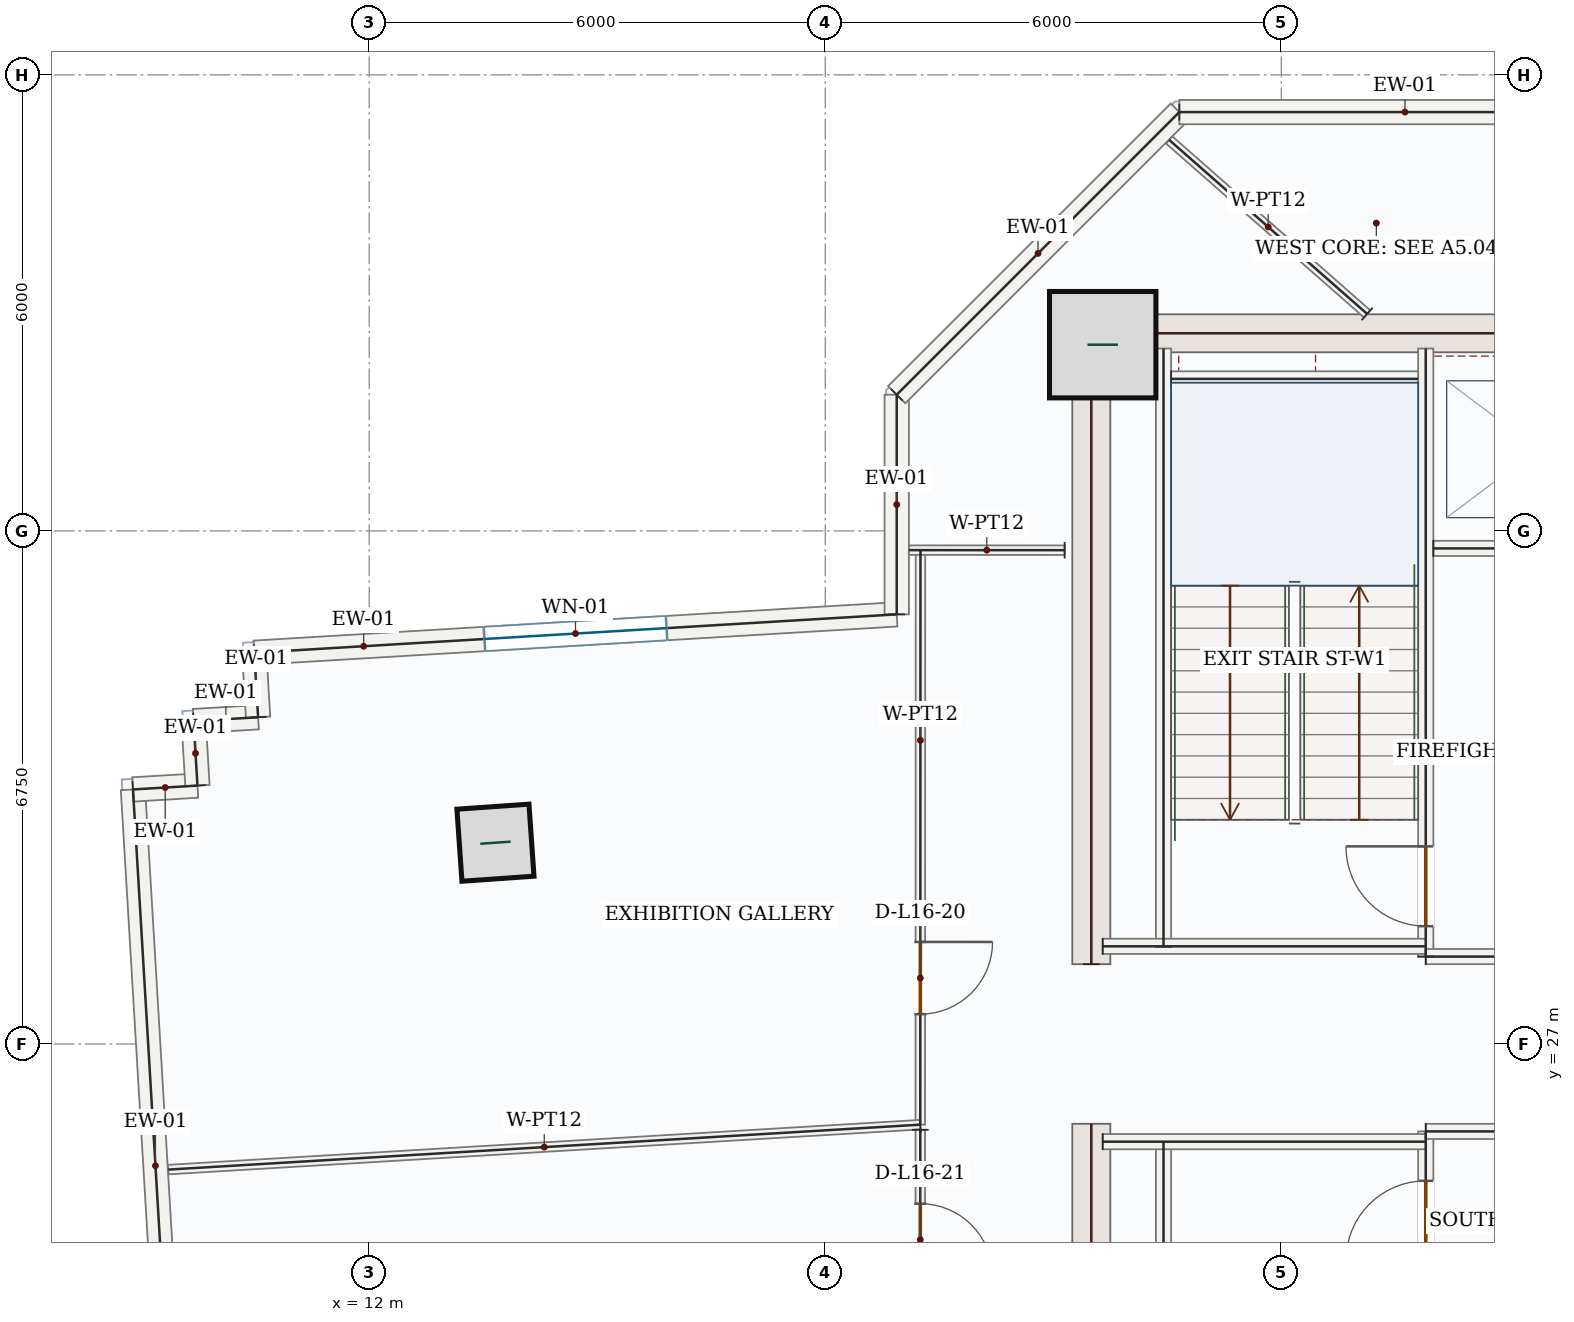
"""IFC4 building model, lengths in metres.
Left out: names, types, materials, properties, quantities, classifications, styles, units other than length and angle.
Written with IfcOpenShell. Run it as: python <this file> out.ifc"""

import sys

from ifc_helpers import new_model, si_unit, direction, frame, frame_2d, origin, origin_2d, place, context, subcontext, project, spatial, rectangle, hollow_rectangle, extrude, source, transform, mapped, element, fill, save


model = new_model("IFC4")
c1 = context("Model", 3, precision=1e-05, world=origin(), true_north=direction((0.0, 1.0)))
c2 = subcontext(c1, "Body", "Model", "MODEL_VIEW")
j1 = project(units=[si_unit("LENGTHUNIT", "METRE"), si_unit("PLANEANGLEUNIT", "RADIAN")], contexts=[c1])
p1 = place(None, origin())
s1 = spatial("IfcSite", under=j1, at=p1, CompositionType="ELEMENT")
p2 = place(p1, origin())
s2 = spatial("IfcBuilding", under=s1, at=p2, CompositionType="ELEMENT")
p3 = place(p2, frame((0.0, 0.0, 75.3)))
s3 = spatial("IfcBuildingStorey", under=s2, at=p3, CompositionType="ELEMENT", Elevation=75.3)
m1 = source(origin(), c2, "Body", "SweptSolid", [
    extrude(rectangle(XDim=8.55, YDim=0.5, at=frame_2d((4.275, 0.0))), origin(), (0.0, 0.0, 1.0), 3.95),
])
for number, where, z_axis, x_axis in (
    (1, (21.5, 17.4, 0.0), (0.0, 0.0, 1.0), (0.0, 1.0, 0.0)),
    (2, (21.5, 28.05, 0.0), (0.0, 0.0, 1.0), (0.0, 1.0, 0.0)),
):
    element("IfcWall", number, at=place(p3, frame(where, z_axis=z_axis, x_axis=x_axis)), inside=s3, PredefinedType="SHEAR", context=c2, shape_type="MappedRepresentation", body=[
        mapped(m1, transform((0.0, 0.0, 0.0), x_axis=(1.0, 0.0, 0.0), y_axis=(0.0, 1.0, 0.0), z_axis=(0.0, 0.0, 1.0), scale=1.0)),
    ])
m2 = source(origin(), c2, "Body", "SweptSolid", [
    extrude(rectangle(XDim=7.0, YDim=0.5, at=frame_2d((3.5, 0.0))), origin(), (0.0, 0.0, 1.0), 3.95),
])
p4 = place(p3, frame((21.75, 36.35, 0.0), z_axis=(0.0, 0.0, 1.0), x_axis=(1.0, 0.0, 0.0)))
e3 = element("IfcWall", 3, at=p4, inside=s3, PredefinedType="SHEAR", context=c2, shape_type="MappedRepresentation", body=[
    mapped(m2, transform((0.0, 0.0, 0.0), x_axis=(1.0, 0.0, 0.0), y_axis=(0.0, 1.0, 0.0), z_axis=(0.0, 0.0, 1.0), scale=1.0)),
])
m3 = source(origin(), c2, "Body", "SweptSolid", [
    extrude(rectangle(XDim=1.4, YDim=1.4, at=origin_2d()), origin(), (0.0, 0.0, 1.0), 4.2),
])
p5 = place(p3, frame((21.65, 36.2, 0.0), z_axis=(0.0, 0.0, 1.0), x_axis=(1.0, 0.0, 0.0)))
e4 = element("IfcColumn", 4, at=p5, inside=s3, PredefinedType="COLUMN", context=c2, shape_type="MappedRepresentation", body=[
    mapped(m3, transform((0.0, 0.0, 0.0), x_axis=(1.0, 0.0, 0.0), y_axis=(0.0, 1.0, 0.0), z_axis=(0.0, 0.0, 1.0), scale=1.0)),
])
m4 = source(origin(), c2, "Body", "SweptSolid", [
    extrude(hollow_rectangle(XDim=0.95, YDim=0.95, WallThickness=0.05, at=origin_2d()), origin(), (0.0, 0.0, 1.0), 4.2),
])
p6 = place(p3, frame((13.661, 29.648, 0.0), z_axis=(0.0, 0.0, 1.0), x_axis=(0.99756405026, 0.069756473744, 0.0)))
e5 = element("IfcColumn", 5, at=p6, inside=s3, PredefinedType="COLUMN", context=c2, shape_type="MappedRepresentation", body=[
    mapped(m4, transform((0.0, 0.0, 0.0), x_axis=(1.0, 0.0, 0.0), y_axis=(0.0, 1.0, 0.0), z_axis=(0.0, 0.0, 1.0), scale=1.0)),
])
m5 = source(origin(), c2, "Body", "SweptSolid", [
    extrude(rectangle(XDim=9.92, YDim=0.32, at=frame_2d((4.96, 0.0))), origin(), (0.0, 0.0, 1.0), 3.95),
])
p7 = place(p3, frame((9.484, 20.447, 0.0), z_axis=(0.0, 0.0, 1.0), x_axis=(-0.059656871726, 0.998218942745, 0.0)))
e6 = element("IfcWall", 6, at=p7, inside=s3, PredefinedType="SOLIDWALL", context=c2, shape_type="MappedRepresentation", body=[
    mapped(m5, transform((0.0, 0.0, 0.0), x_axis=(1.0, 0.0, 0.0), y_axis=(0.0, 1.0, 0.0), z_axis=(0.0, 0.0, 1.0), scale=1.0)),
])
m6 = source(origin(), c2, "Body", "SweptSolid", [
    extrude(rectangle(XDim=0.85, YDim=0.32, at=frame_2d((0.425, 0.0))), origin(), (0.0, 0.0, 1.0), 3.95),
])
for number, where, z_axis, x_axis in (
    (7, (8.892, 30.349, 0.0), (0.0, 0.0, 1.0), (0.998, 0.059, 0.0)),
    (8, (9.74, 30.399, 0.0), (0.0, 0.0, 1.0), (-0.06, 0.998, 0.0)),
):
    element("IfcWall", number, at=place(p3, frame(where, z_axis=z_axis, x_axis=x_axis)), inside=s3, PredefinedType="SOLIDWALL", context=c2, shape_type="MappedRepresentation", body=[
        mapped(m6, transform((0.0, 0.0, 0.0), x_axis=(1.0, 0.0, 0.0), y_axis=(0.0, 1.0, 0.0), z_axis=(0.0, 0.0, 1.0), scale=1.0)),
    ])
m7 = source(origin(), c2, "Body", "SweptSolid", [
    extrude(rectangle(XDim=0.85, YDim=0.32, at=frame_2d((0.425, 0.0))), origin(), (0.0, 0.0, 1.0), 3.95),
])
p8 = place(p3, frame((9.69, 31.248, 0.0), z_axis=(0.0, 0.0, 1.0), x_axis=(0.998230513845, 0.059462939961, 0.0)))
e9 = element("IfcWall", 9, at=p8, inside=s3, PredefinedType="SOLIDWALL", context=c2, shape_type="MappedRepresentation", body=[
    mapped(m7, transform((0.0, 0.0, 0.0), x_axis=(1.0, 0.0, 0.0), y_axis=(0.0, 1.0, 0.0), z_axis=(0.0, 0.0, 1.0), scale=1.0)),
])
p9 = place(p3, frame((10.538, 31.299, 0.0), z_axis=(0.0, 0.0, 1.0), x_axis=(-0.059445893707, 0.998231529116, 0.0)))
e10 = element("IfcWall", 10, at=p9, inside=s3, PredefinedType="SOLIDWALL", context=c2, shape_type="MappedRepresentation", body=[
    mapped(m6, transform((0.0, 0.0, 0.0), x_axis=(1.0, 0.0, 0.0), y_axis=(0.0, 1.0, 0.0), z_axis=(0.0, 0.0, 1.0), scale=1.0)),
])
p10 = place(p3, frame((10.488, 32.147, 0.0), z_axis=(0.0, 0.0, 1.0), x_axis=(0.998219055518, 0.059654984716, 0.0)))
e11 = element("IfcWall", 11, at=p10, inside=s3, PredefinedType="SOLIDWALL", context=c2, shape_type="SweptSolid", body=[
    extrude(rectangle(XDim=8.468, YDim=0.32, at=frame_2d((4.234, 0.0))), origin(), (0.0, 0.0, 1.0), 3.95),
])
p11 = place(p10, frame((3.034, 0.0, 0.85)))
e12 = element("IfcOpeningElement", 12, at=p11, cuts=e11, PredefinedType="OPENING", context=c2, shape_type="SweptSolid", body=[
    extrude(rectangle(XDim=2.4, YDim=1.8, at=frame_2d((1.2, 0.9))), frame((0.0, 0.17, 0.0), z_axis=(0.0, -1.0, 0.0), x_axis=(1.0, 0.0, 0.0)), (0.0, 0.0, 1.0), 0.34),
])
m8 = source(origin(), c2, "Body", "SweptSolid", [
    extrude(rectangle(XDim=2.89, YDim=0.32, at=frame_2d((1.445, 0.0))), origin(), (0.0, 0.0, 1.0), 3.95),
])
p12 = place(p3, frame((18.94, 32.652, 0.0), z_axis=(0.0, 0.0, 1.0), x_axis=(0.0, 1.0, 0.0)))
e13 = element("IfcWall", 13, at=p12, inside=s3, PredefinedType="SOLIDWALL", context=c2, shape_type="MappedRepresentation", body=[
    mapped(m8, transform((0.0, 0.0, 0.0), x_axis=(1.0, 0.0, 0.0), y_axis=(0.0, 1.0, 0.0), z_axis=(0.0, 0.0, 1.0), scale=1.0)),
])
m9 = source(origin(), c2, "Body", "SweptSolid", [
    extrude(rectangle(XDim=5.258, YDim=0.32, at=frame_2d((2.629, 0.0))), origin(), (0.0, 0.0, 1.0), 3.95),
])
p13 = place(p3, frame((18.94, 35.542, 0.0), z_axis=(0.0, 0.0, 1.0), x_axis=(0.707106781187, 0.707106781187, 0.0)))
e14 = element("IfcWall", 14, at=p13, inside=s3, PredefinedType="SOLIDWALL", context=c2, shape_type="MappedRepresentation", body=[
    mapped(m9, transform((0.0, 0.0, 0.0), x_axis=(1.0, 0.0, 0.0), y_axis=(0.0, 1.0, 0.0), z_axis=(0.0, 0.0, 1.0), scale=1.0)),
])
m10 = source(origin(), c2, "Body", "SweptSolid", [
    extrude(rectangle(XDim=5.938, YDim=0.32, at=frame_2d((2.969, 0.0))), origin(), (0.0, 0.0, 1.0), 3.95),
])
p14 = place(p3, frame((22.658, 39.26, 0.0), z_axis=(0.0, 0.0, 1.0), x_axis=(1.0, 0.0, 0.0)))
e15 = element("IfcWall", 15, at=p14, inside=s3, PredefinedType="SOLIDWALL", context=c2, shape_type="MappedRepresentation", body=[
    mapped(m10, transform((0.0, 0.0, 0.0), x_axis=(1.0, 0.0, 0.0), y_axis=(0.0, 1.0, 0.0), z_axis=(0.0, 0.0, 1.0), scale=1.0)),
])
m11 = source(origin(), c2, "Body", "SweptSolid", [
    extrude(rectangle(XDim=7.87, YDim=0.2, at=frame_2d((3.935, 0.0))), origin(), (0.0, 0.0, 1.0), 3.95),
])
for number, where, z_axis, x_axis in (
    (16, (22.45, 17.85, 0.0), (0.0, 0.0, 1.0), (0.0, 1.0, 0.0)),
    (17, (22.45, 28.28, 0.0), (0.0, 0.0, 1.0), (0.0, 1.0, 0.0)),
):
    element("IfcWall", number, at=place(p3, frame(where, z_axis=z_axis, x_axis=x_axis)), inside=s3, PredefinedType="SOLIDWALL", context=c2, shape_type="MappedRepresentation", body=[
        mapped(m11, transform((0.0, 0.0, 0.0), x_axis=(1.0, 0.0, 0.0), y_axis=(0.0, 1.0, 0.0), z_axis=(0.0, 0.0, 1.0), scale=1.0)),
    ])
p15 = place(p3, frame((25.9, 17.85, 0.0), z_axis=(0.0, 0.0, 1.0), x_axis=(0.0, 1.0, 0.0)))
e18 = element("IfcWall", 18, at=p15, inside=s3, PredefinedType="SOLIDWALL", context=c2, shape_type="SweptSolid", body=[
    extrude(rectangle(XDim=8.0, YDim=0.2, at=frame_2d((4.0, 0.0))), origin(), (0.0, 0.0, 1.0), 3.95),
])
p16 = place(p15, frame((6.3, 0.0, 0.0)))
e19 = element("IfcOpeningElement", 19, at=p16, cuts=e18, PredefinedType="OPENING", context=c2, shape_type="SweptSolid", body=[
    extrude(rectangle(XDim=1.05, YDim=2.15, at=frame_2d((0.525, 1.075))), frame((0.0, 0.11, 0.0), z_axis=(0.0, -1.0, 0.0), x_axis=(1.0, 0.0, 0.0)), (0.0, 0.0, 1.0), 0.22),
])
p17 = place(p3, frame((25.9, 28.15, 0.0), z_axis=(0.0, 0.0, 1.0), x_axis=(0.0, 1.0, 0.0)))
e20 = element("IfcWall", 20, at=p17, inside=s3, PredefinedType="SOLIDWALL", context=c2, shape_type="SweptSolid", body=[
    extrude(rectangle(XDim=8.0, YDim=0.2, at=frame_2d((4.0, 0.0))), origin(), (0.0, 0.0, 1.0), 3.95),
])
p18 = place(p17, frame((0.4, 0.0, 0.0)))
e21 = element("IfcOpeningElement", 21, at=p18, cuts=e20, PredefinedType="OPENING", context=c2, shape_type="SweptSolid", body=[
    extrude(rectangle(XDim=1.05, YDim=2.15, at=frame_2d((0.525, 1.075))), frame((0.0, 0.11, 0.0), z_axis=(0.0, -1.0, 0.0), x_axis=(1.0, 0.0, 0.0)), (0.0, 0.0, 1.0), 0.22),
])
m12 = source(origin(), c2, "Body", "SweptSolid", [
    extrude(rectangle(XDim=4.25, YDim=0.2, at=frame_2d((2.125, 0.0))), origin(), (0.0, 0.0, 1.0), 3.95),
])
p19 = place(p3, frame((21.65, 25.715, 0.0), z_axis=(0.0, 0.0, 1.0), x_axis=(1.0, 0.0, 0.0)))
e22 = element("IfcWall", 22, at=p19, inside=s3, PredefinedType="SOLIDWALL", context=c2, shape_type="MappedRepresentation", body=[
    mapped(m12, transform((0.0, 0.0, 0.0), x_axis=(1.0, 0.0, 0.0), y_axis=(0.0, 1.0, 0.0), z_axis=(0.0, 0.0, 1.0), scale=1.0)),
])
m13 = source(origin(), c2, "Body", "SweptSolid", [
    extrude(rectangle(XDim=3.0, YDim=0.2, at=frame_2d((1.5, 0.0))), origin(), (0.0, 0.0, 1.0), 3.95),
])
p20 = place(p3, frame((25.9, 25.85, 0.0), z_axis=(0.0, 0.0, 1.0), x_axis=(1.0, 0.0, 0.0)))
e23 = element("IfcWall", 23, at=p20, inside=s3, PredefinedType="SOLIDWALL", context=c2, shape_type="MappedRepresentation", body=[
    mapped(m13, transform((0.0, 0.0, 0.0), x_axis=(1.0, 0.0, 0.0), y_axis=(0.0, 1.0, 0.0), z_axis=(0.0, 0.0, 1.0), scale=1.0)),
])
p21 = place(p3, frame((21.65, 28.285, 0.0), z_axis=(0.0, 0.0, 1.0), x_axis=(1.0, 0.0, 0.0)))
e24 = element("IfcWall", 24, at=p21, inside=s3, PredefinedType="SOLIDWALL", context=c2, shape_type="MappedRepresentation", body=[
    mapped(m12, transform((0.0, 0.0, 0.0), x_axis=(1.0, 0.0, 0.0), y_axis=(0.0, 1.0, 0.0), z_axis=(0.0, 0.0, 1.0), scale=1.0)),
])
p22 = place(p3, frame((25.9, 28.15, 0.0), z_axis=(0.0, 0.0, 1.0), x_axis=(1.0, 0.0, 0.0)))
e25 = element("IfcWall", 25, at=p22, inside=s3, PredefinedType="SOLIDWALL", context=c2, shape_type="MappedRepresentation", body=[
    mapped(m13, transform((0.0, 0.0, 0.0), x_axis=(1.0, 0.0, 0.0), y_axis=(0.0, 1.0, 0.0), z_axis=(0.0, 0.0, 1.0), scale=1.0)),
])
m14 = source(origin(), c2, "Body", "SweptSolid", [
    extrude(rectangle(XDim=3.25, YDim=0.2, at=frame_2d((1.625, 0.0))), origin(), (0.0, 0.0, 1.0), 3.95),
])
p23 = place(p3, frame((22.55, 35.75, 0.0), z_axis=(0.0, 0.0, 1.0), x_axis=(1.0, 0.0, 0.0)))
e26 = element("IfcWall", 26, at=p23, inside=s3, PredefinedType="SOLIDWALL", context=c2, shape_type="MappedRepresentation", body=[
    mapped(m14, transform((0.0, 0.0, 0.0), x_axis=(1.0, 0.0, 0.0), y_axis=(0.0, 1.0, 0.0), z_axis=(0.0, 0.0, 1.0), scale=1.0)),
])
p24 = place(p3, frame((26.0, 33.52, 0.0), z_axis=(0.0, 0.0, 1.0), x_axis=(1.0, 0.0, 0.0)))
e27 = element("IfcWall", 27, at=p24, inside=s3, PredefinedType="SOLIDWALL", context=c2, shape_type="SweptSolid", body=[
    extrude(rectangle(XDim=2.75, YDim=0.2, at=frame_2d((1.375, 0.0))), origin(), (0.0, 0.0, 1.0), 3.95),
])
p25 = place(p24, frame((0.82, 0.0, 0.0)))
e28 = element("IfcOpeningElement", 28, at=p25, cuts=e27, PredefinedType="OPENING", context=c2, shape_type="SweptSolid", body=[
    extrude(rectangle(XDim=1.1, YDim=2.15, at=frame_2d((0.55, 1.075))), frame((0.0, 0.11, 0.0), z_axis=(0.0, -1.0, 0.0), x_axis=(1.0, 0.0, 0.0)), (0.0, 0.0, 1.0), 0.22),
])
m15 = source(origin(), c2, "Body", "SweptSolid", [
    extrude(rectangle(XDim=3.467, YDim=0.125, at=frame_2d((1.733, 0.0))), origin(), (0.0, 0.0, 1.0), 3.95),
])
p26 = place(p3, frame((25.129, 36.605, 0.0), z_axis=(0.0, 0.0, 1.0), x_axis=(-0.751135268809, 0.66014832269, 0.0)))
e29 = element("IfcWall", 29, at=p26, inside=s3, PredefinedType="PARTITIONING", context=c2, shape_type="MappedRepresentation", body=[
    mapped(m15, transform((0.0, 0.0, 0.0), x_axis=(1.0, 0.0, 0.0), y_axis=(0.0, 1.0, 0.0), z_axis=(0.0, 0.0, 1.0), scale=1.0)),
])
p27 = place(p3, frame((19.253, 33.497, 0.0), z_axis=(0.0, 0.0, 1.0), x_axis=(-0.000355308612, -0.999999936878, 0.0)))
e30 = element("IfcWall", 30, at=p27, inside=s3, PredefinedType="PARTITIONING", context=c2, shape_type="SweptSolid", body=[
    extrude(rectangle(XDim=7.558, YDim=0.125, at=frame_2d((3.779, 0.0))), origin(), (0.0, 0.0, 1.0), 3.95),
])
p28 = place(p27, frame((5.155, 0.0, 0.0)))
e31 = element("IfcOpeningElement", 31, at=p28, cuts=e30, PredefinedType="OPENING", context=c2, shape_type="SweptSolid", body=[
    extrude(rectangle(XDim=0.95, YDim=2.15, at=frame_2d((0.475, 1.075))), frame((0.0, 0.073, 0.0), z_axis=(0.0, -1.0, 0.0), x_axis=(1.0, 0.0, 0.0)), (0.0, 0.0, 1.0), 0.145),
])
m16 = source(origin(), c2, "Body", "SweptSolid", [
    extrude(rectangle(XDim=9.911, YDim=0.125, at=frame_2d((4.956, 0.0))), origin(), (0.0, 0.0, 1.0), 3.95),
])
p29 = place(p3, frame((19.25, 25.939, 0.0), z_axis=(0.0, 0.0, 1.0), x_axis=(-0.998218808208, -0.05965912285, 0.0)))
e32 = element("IfcWall", 32, at=p29, inside=s3, PredefinedType="PARTITIONING", context=c2, shape_type="MappedRepresentation", body=[
    mapped(m16, transform((0.0, 0.0, 0.0), x_axis=(1.0, 0.0, 0.0), y_axis=(0.0, 1.0, 0.0), z_axis=(0.0, 0.0, 1.0), scale=1.0)),
])
m17 = source(origin(), c2, "Body", "SweptSolid", [
    extrude(rectangle(XDim=2.049, YDim=0.125, at=frame_2d((1.025, 0.0))), origin(), (0.0, 0.0, 1.0), 3.95),
])
p30 = place(p3, frame((21.149, 33.497, 0.0), z_axis=(0.0, 0.0, 1.0), x_axis=(-0.999999936133, 0.000357398119, 0.0)))
e33 = element("IfcWall", 33, at=p30, inside=s3, PredefinedType="PARTITIONING", context=c2, shape_type="MappedRepresentation", body=[
    mapped(m17, transform((0.0, 0.0, 0.0), x_axis=(1.0, 0.0, 0.0), y_axis=(0.0, 1.0, 0.0), z_axis=(0.0, 0.0, 1.0), scale=1.0)),
])
p31 = place(p3, frame((19.25, 25.871, 0.0), z_axis=(0.0, 0.0, 1.0), x_axis=(9.0962841e-05, -0.999999995863, 0.0)))
e34 = element("IfcWall", 34, at=p31, inside=s3, PredefinedType="PARTITIONING", context=c2, shape_type="SweptSolid", body=[
    extrude(rectangle(XDim=5.368, YDim=0.125, at=frame_2d((2.684, 0.0))), origin(), (0.0, 0.0, 1.0), 3.95),
])
p32 = place(p31, frame((0.972, 0.0, 0.0)))
e35 = element("IfcOpeningElement", 35, at=p32, cuts=e34, PredefinedType="OPENING", context=c2, shape_type="SweptSolid", body=[
    extrude(rectangle(XDim=0.95, YDim=2.15, at=frame_2d((0.475, 1.075))), frame((0.0, 0.073, 0.0), z_axis=(0.0, -1.0, 0.0), x_axis=(1.0, 0.0, 0.0)), (0.0, 0.0, 1.0), 0.145),
])
m18 = source(origin(), c2, "Body", "SweptSolid", [
    extrude(rectangle(XDim=2.4, YDim=1.8, at=frame_2d((1.2, 0.9))), frame((0.0, 0.03, 0.0), z_axis=(0.0, -1.0, 0.0), x_axis=(1.0, 0.0, 0.0)), (0.0, 0.0, 1.0), 0.06),
])
p33 = place(p11, origin())
e36 = element("IfcWindow", 36, at=p33, inside=s3, PartitioningType="DOUBLE_PANEL_VERTICAL", PredefinedType="WINDOW", context=c2, shape_type="MappedRepresentation", body=[
    mapped(m18, transform((0.0, 0.0, 0.0), x_axis=(1.0, 0.0, 0.0), y_axis=(0.0, 1.0, 0.0), z_axis=(0.0, 0.0, 1.0), scale=1.0)),
])
fill(e12, e36)
m19 = source(origin(), c2, "Body", "SweptSolid", [
    extrude(rectangle(XDim=1.05, YDim=2.15, at=frame_2d((0.525, 1.075))), frame((0.0, 0.025, 0.0), z_axis=(0.0, -1.0, 0.0), x_axis=(1.0, 0.0, 0.0)), (0.0, 0.0, 1.0), 0.05),
])
p34 = place(p18, origin())
e37 = element("IfcDoor", 37, at=p34, inside=s3, OperationType="SINGLE_SWING_RIGHT", PredefinedType="DOOR", context=c2, shape_type="MappedRepresentation", body=[
    mapped(m19, transform((0.0, 0.0, 0.0), x_axis=(1.0, 0.0, 0.0), y_axis=(0.0, 1.0, 0.0), z_axis=(0.0, 0.0, 1.0), scale=1.0)),
])
fill(e21, e37)
p35 = place(p16, origin())
e38 = element("IfcDoor", 38, at=p35, inside=s3, OperationType="SINGLE_SWING_LEFT", PredefinedType="DOOR", context=c2, shape_type="MappedRepresentation", body=[
    mapped(m19, transform((0.0, 0.0, 0.0), x_axis=(1.0, 0.0, 0.0), y_axis=(0.0, 1.0, 0.0), z_axis=(0.0, 0.0, 1.0), scale=1.0)),
])
fill(e19, e38)
m20 = source(origin(), c2, "Body", "SweptSolid", [
    extrude(rectangle(XDim=0.95, YDim=2.15, at=frame_2d((0.475, 1.075))), frame((0.0, 0.025, 0.0), z_axis=(0.0, -1.0, 0.0), x_axis=(1.0, 0.0, 0.0)), (0.0, 0.0, 1.0), 0.05),
])
p36 = place(p28, origin())
e39 = element("IfcDoor", 39, at=p36, inside=s3, OperationType="SINGLE_SWING_LEFT", PredefinedType="DOOR", context=c2, shape_type="MappedRepresentation", body=[
    mapped(m20, transform((0.0, 0.0, 0.0), x_axis=(1.0, 0.0, 0.0), y_axis=(0.0, 1.0, 0.0), z_axis=(0.0, 0.0, 1.0), scale=1.0)),
])
fill(e31, e39)
p37 = place(p32, origin())
e40 = element("IfcDoor", 40, at=p37, inside=s3, OperationType="SINGLE_SWING_RIGHT", PredefinedType="DOOR", context=c2, shape_type="MappedRepresentation", body=[
    mapped(m20, transform((0.0, 0.0, 0.0), x_axis=(1.0, 0.0, 0.0), y_axis=(0.0, 1.0, 0.0), z_axis=(0.0, 0.0, 1.0), scale=1.0)),
])
fill(e35, e40)
save(model, sys.argv[1])
